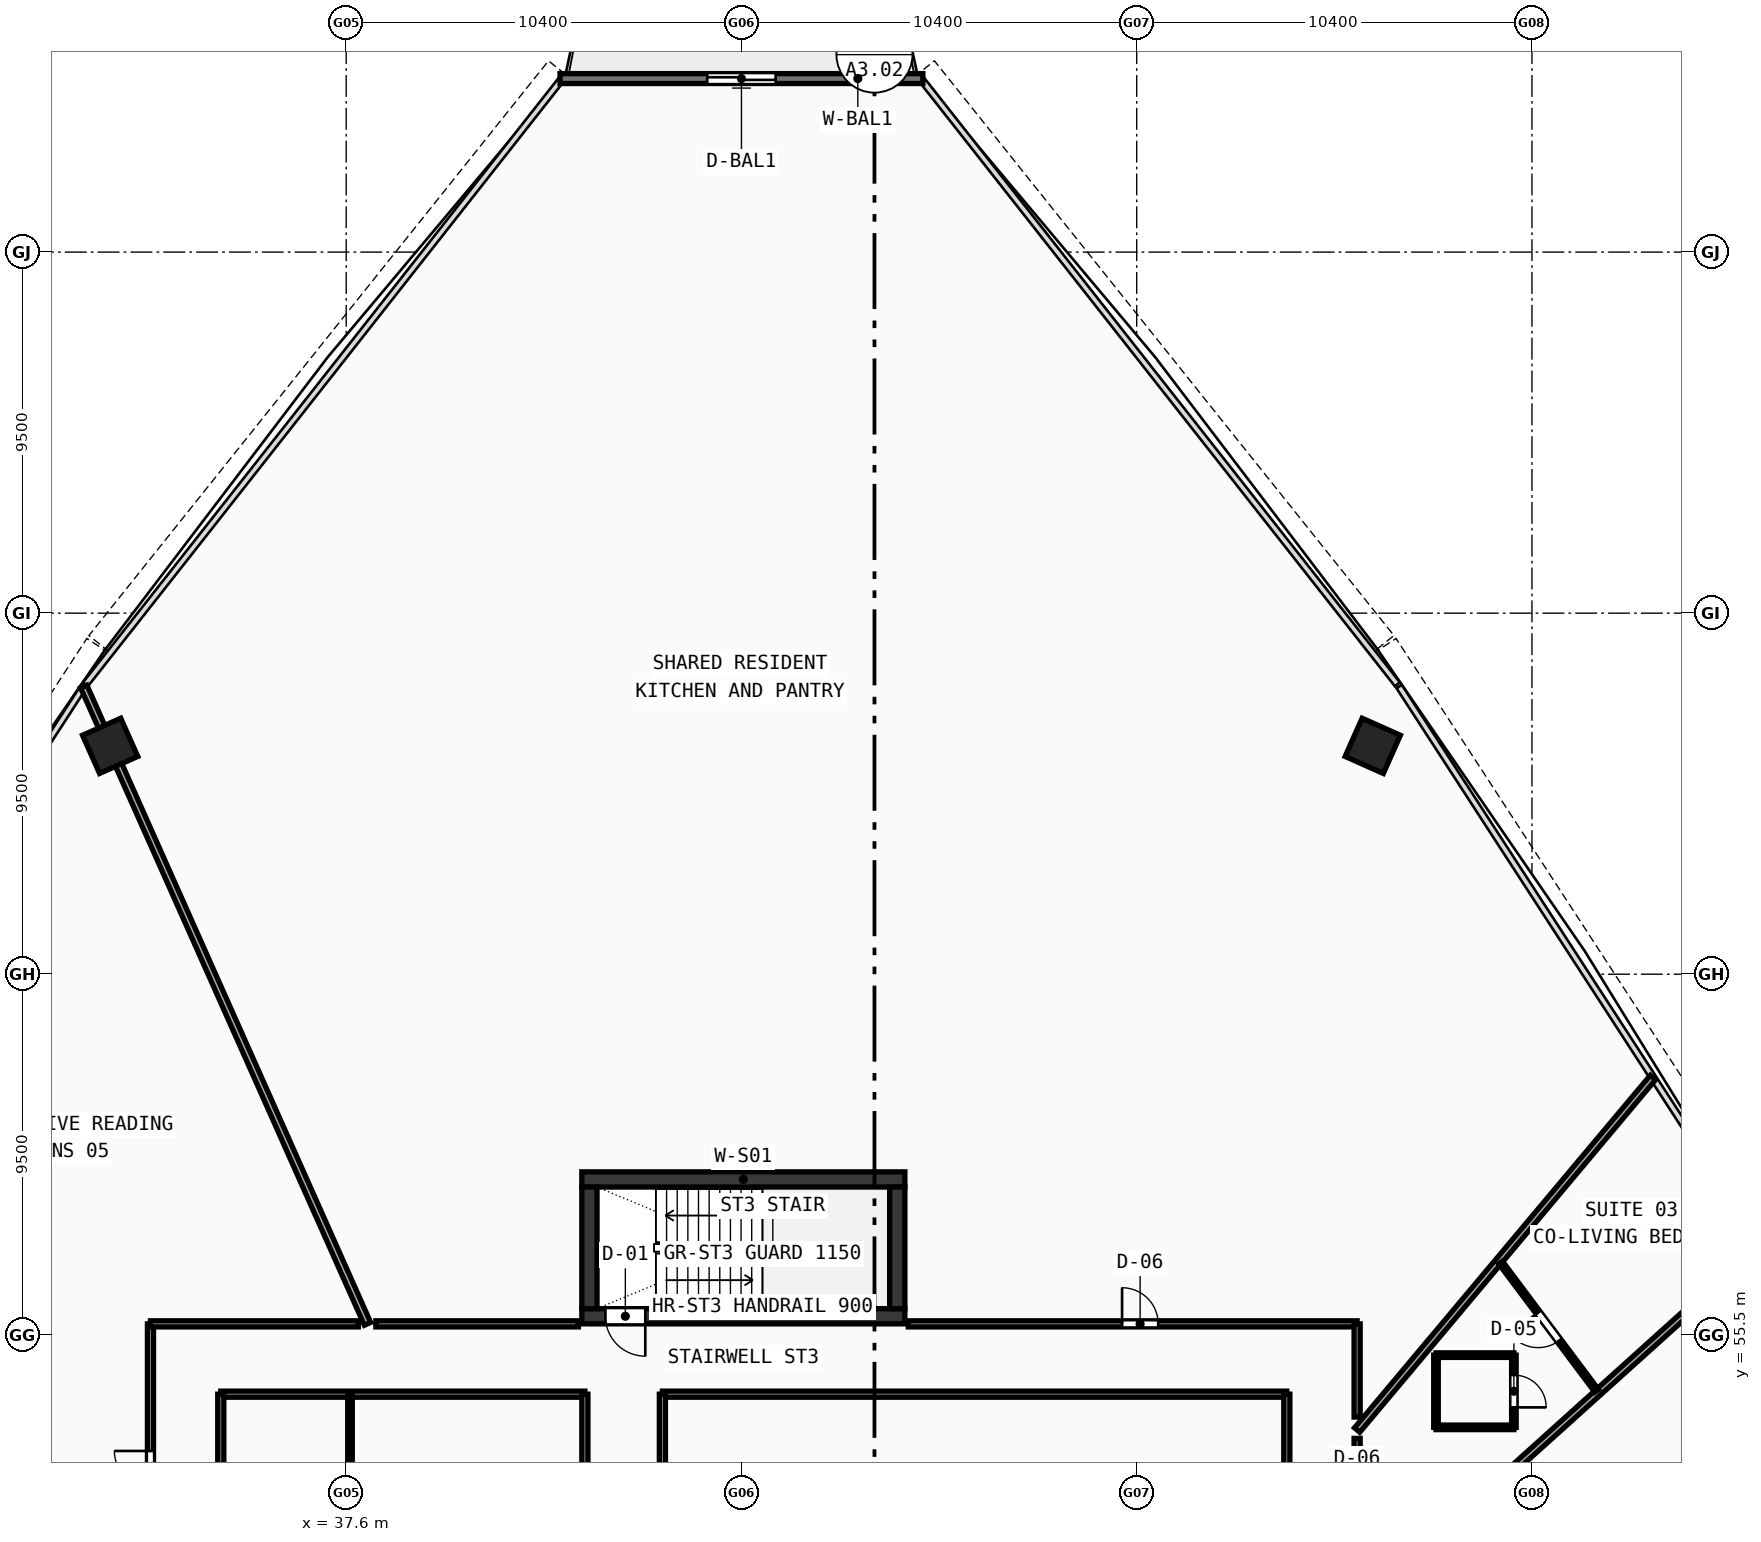
"""IFC4 building model, lengths in metres.
Left out: names, types, materials, properties, quantities, classifications, styles, units other than length and angle.
Written with IfcOpenShell. Run it as: python <this file> out.ifc"""

import sys

from ifc_helpers import new_model, si_unit, direction, frame, frame_2d, origin, origin_with_axes, origin_2d, place, context, subcontext, project, spatial, rectangle, hollow_rectangle, extrude, source, transform, mapped, element, fill, save


model = new_model("IFC4")
c1 = context("Model", 3, precision=1e-05, world=origin(), true_north=direction((0.0, 1.0)))
c2 = subcontext(c1, "Body", "Model", "MODEL_VIEW")
j1 = project(units=[si_unit("LENGTHUNIT", "METRE"), si_unit("PLANEANGLEUNIT", "RADIAN")], contexts=[c1])
p1 = place(None, origin())
s1 = spatial("IfcSite", under=j1, at=p1, CompositionType="ELEMENT")
p2 = place(p1, origin())
s2 = spatial("IfcBuilding", under=s1, at=p2, CompositionType="ELEMENT")
p3 = place(p2, frame((0.0, 0.0, 41.29)))
s3 = spatial("IfcBuildingStorey", under=s2, at=p3, CompositionType="ELEMENT", Elevation=41.29)
p4 = place(p3, frame((43.8, 59.6, 0.0), z_axis=(0.0, 0.0, 1.0), x_axis=(1.0, 0.0, 0.0)))
e1 = element("IfcWall", 1, at=p4, inside=s3, PredefinedType="SHEAR", context=c2, shape_type="SweptSolid", body=[
    extrude(rectangle(XDim=8.5, YDim=0.4, at=frame_2d((4.25, 0.0))), origin(), (0.0, 0.0, 1.0), 3.37),
])
p5 = place(p3, frame((43.8, 56.0, 0.0), z_axis=(0.0, 0.0, 1.0), x_axis=(1.0, 0.0, 0.0)))
e2 = element("IfcWall", 2, at=p5, inside=s3, PredefinedType="SHEAR", context=c2, shape_type="SweptSolid", body=[
    extrude(rectangle(XDim=8.5, YDim=0.4, at=frame_2d((4.25, 0.0))), origin(), (0.0, 0.0, 1.0), 3.37),
])
p6 = place(p5, frame((0.62, 0.0, 0.0)))
e3 = element("IfcOpeningElement", 3, at=p6, cuts=e2, PredefinedType="OPENING", context=c2, shape_type="SweptSolid", body=[
    extrude(rectangle(XDim=1.05, YDim=2.1, at=frame_2d((0.525, 1.05))), frame((0.0, 0.21, 0.0), z_axis=(0.0, -1.0, 0.0), x_axis=(1.0, 0.0, 0.0)), (0.0, 0.0, 1.0), 0.42),
])
for number, where, z_axis, x_axis in (
    (4, (44.0, 56.2, 0.0), (0.0, 0.0, 1.0), (0.0, 1.0, 0.0)),
    (5, (52.1, 56.2, 0.0), (0.0, 0.0, 1.0), (0.0, 1.0, 0.0)),
):
    element("IfcWall", number, at=place(p3, frame(where, z_axis=z_axis, x_axis=x_axis)), inside=s3, PredefinedType="SHEAR", context=c2, shape_type="SweptSolid", body=[
        extrude(rectangle(XDim=3.2, YDim=0.4, at=frame_2d((1.6, 0.0))), origin(), (0.0, 0.0, 1.0), 3.37),
    ])
m1 = source(origin(), c2, "Body", "SweptSolid", [
    extrude(hollow_rectangle(XDim=1.1, YDim=1.1, WallThickness=0.045, at=origin_2d()), origin(), (0.0, 0.0, 1.0), 3.63),
])
for number, where, z_axis, x_axis in (
    (6, (64.611, 71.009, -0.26), (0.0, 0.0, 1.0), (-0.914, 0.407, 0.0)),
    (7, (31.389, 71.009, -0.26), (0.0, 0.0, 1.0), (-0.914, -0.407, 0.0)),
):
    element("IfcColumn", number, at=place(p3, frame(where, z_axis=z_axis, x_axis=x_axis)), inside=s3, PredefinedType="COLUMN", context=c2, shape_type="MappedRepresentation", body=[
        mapped(m1, transform((0.0, 0.0, 0.0), scale=1.0)),
    ])
p7 = place(p3, frame((52.773, 88.566, 0.0), z_axis=(0.0, 0.0, 1.0), x_axis=(-1.0, 0.0, 0.0)))
e8 = element("IfcWall", 8, at=p7, inside=s3, PredefinedType="STANDARD", context=c2, shape_type="SweptSolid", body=[
    extrude(rectangle(XDim=9.546, YDim=0.26, at=frame_2d((4.773, 0.0))), origin(), (0.0, 0.0, 1.0), 3.37),
])
p8 = place(p7, frame((3.873, 0.0, 0.0)))
e9 = element("IfcOpeningElement", 9, at=p8, cuts=e8, PredefinedType="OPENING", context=c2, shape_type="SweptSolid", body=[
    extrude(rectangle(XDim=1.8, YDim=2.15, at=frame_2d((0.9, 1.075))), frame((0.0, 0.14, 0.0), z_axis=(0.0, -1.0, 0.0), x_axis=(1.0, 0.0, 0.0)), (0.0, 0.0, 1.0), 0.28),
])
p9 = place(p3, frame((34.3, 53.95, 0.0), z_axis=(0.0, 0.0, 1.0), x_axis=(1.0, 0.0, 0.0)))
e10 = element("IfcWall", 10, at=p9, inside=s3, PredefinedType="PARTITIONING", context=c2, shape_type="SweptSolid", body=[
    extrude(rectangle(XDim=9.58, YDim=0.16, at=frame_2d((4.79, 0.0))), origin(), (0.0, 0.0, 1.0), 2.67),
])
for number, where, z_axis, x_axis in (
    (11, (34.3, 42.25, 0.0), (0.0, 0.0, 1.0), (0.0, 1.0, 0.0)),
    (12, (43.88, 42.25, 0.0), (0.0, 0.0, 1.0), (0.0, 1.0, 0.0)),
):
    element("IfcWall", number, at=place(p3, frame(where, z_axis=z_axis, x_axis=x_axis)), inside=s3, PredefinedType="PARTITIONING", context=c2, shape_type="SweptSolid", body=[
        extrude(rectangle(XDim=11.7, YDim=0.16, at=frame_2d((5.85, 0.0))), origin(), (0.0, 0.0, 1.0), 2.67),
    ])
p10 = place(p3, frame((37.7, 42.25, 0.0), z_axis=(0.0, 0.0, 1.0), x_axis=(0.0, 1.0, 0.0)))
e13 = element("IfcWall", 13, at=p10, inside=s3, PredefinedType="PARTITIONING", context=c2, shape_type="SweptSolid", body=[
    extrude(rectangle(XDim=11.7, YDim=0.12, at=frame_2d((5.85, 0.0))), origin(), (0.0, 0.0, 1.0), 2.67),
])
p11 = place(p3, frame((45.92, 53.95, 0.0), z_axis=(0.0, 0.0, 1.0), x_axis=(1.0, 0.0, 0.0)))
e14 = element("IfcWall", 14, at=p11, inside=s3, PredefinedType="PARTITIONING", context=c2, shape_type="SweptSolid", body=[
    extrude(rectangle(XDim=16.43, YDim=0.16, at=frame_2d((8.215, 0.0))), origin(), (0.0, 0.0, 1.0), 2.67),
])
p12 = place(p3, frame((45.92, 42.25, 0.0), z_axis=(0.0, 0.0, 1.0), x_axis=(0.0, 1.0, 0.0)))
e15 = element("IfcWall", 15, at=p12, inside=s3, PredefinedType="PARTITIONING", context=c2, shape_type="SweptSolid", body=[
    extrude(rectangle(XDim=11.7, YDim=0.16, at=frame_2d((5.85, 0.0))), origin(), (0.0, 0.0, 1.0), 2.97),
])
p13 = place(p3, frame((62.35, 42.25, 0.0), z_axis=(0.0, 0.0, 1.0), x_axis=(0.0, 1.0, 0.0)))
e16 = element("IfcWall", 16, at=p13, inside=s3, PredefinedType="PARTITIONING", context=c2, shape_type="SweptSolid", body=[
    extrude(rectangle(XDim=11.7, YDim=0.16, at=frame_2d((5.85, 0.0))), origin(), (0.0, 0.0, 1.0), 2.67),
])
p14 = place(p3, frame((64.2, 48.287, 0.0), z_axis=(0.0, 0.0, 1.0), x_axis=(0.743156867614, 0.669117231969, 0.0)))
e17 = element("IfcWall", 17, at=p14, inside=s3, PredefinedType="PARTITIONING", context=c2, shape_type="SweptSolid", body=[
    extrude(rectangle(XDim=14.327, YDim=0.18, at=frame_2d((7.164, 0.0))), origin(), (0.0, 0.0, 1.0), 2.67),
])
p15 = place(p3, frame((64.2, 53.006, 0.0), z_axis=(0.0, 0.0, 1.0), x_axis=(0.642786334534, 0.766045513098, 0.0)))
e18 = element("IfcWall", 18, at=p15, inside=s3, PredefinedType="PARTITIONING", context=c2, shape_type="SweptSolid", body=[
    extrude(rectangle(XDim=12.11, YDim=0.18, at=frame_2d((6.055, 0.0))), origin(), (0.0, 0.0, 1.0), 2.67),
])
p16 = place(p3, frame((38.16, 55.8, 0.0), z_axis=(0.0, 0.0, 1.0), x_axis=(-0.406730734994, 0.913548088067, 0.0)))
e19 = element("IfcWall", 19, at=p16, inside=s3, PredefinedType="PARTITIONING", context=c2, shape_type="SweptSolid", body=[
    extrude(rectangle(XDim=18.356, YDim=0.18, at=frame_2d((9.178, 0.0))), origin(), (0.0, 0.0, 1.0), 2.67),
])
p17 = place(p3, frame((32.45, 47.701, 0.0), z_axis=(0.0, 0.0, 1.0), x_axis=(-0.743155181141, 0.66911910505, 0.0)))
e20 = element("IfcWall", 20, at=p17, inside=s3, PredefinedType="PARTITIONING", context=c2, shape_type="SweptSolid", body=[
    extrude(rectangle(XDim=15.202, YDim=0.18, at=frame_2d((7.601, 0.0))), origin(), (0.0, 0.0, 1.0), 2.67),
])
p18 = place(p3, frame((32.45, 47.997, 0.0), z_axis=(0.0, 0.0, 1.0), x_axis=(0.0, 1.0, 0.0)))
e21 = element("IfcWall", 21, at=p18, inside=s3, PredefinedType="PARTITIONING", context=c2, shape_type="SweptSolid", body=[
    extrude(rectangle(XDim=7.803, YDim=0.16, at=frame_2d((3.901, 0.0))), origin(), (0.0, 0.0, 1.0), 3.37),
])
p19 = place(p18, frame((3.508, 0.0, 0.0)))
e22 = element("IfcOpeningElement", 22, at=p19, cuts=e21, PredefinedType="OPENING", context=c2, shape_type="SweptSolid", body=[
    extrude(rectangle(XDim=0.95, YDim=2.1, at=frame_2d((0.475, 1.05))), frame((0.0, 0.09, 0.0), z_axis=(0.0, -1.0, 0.0), x_axis=(1.0, 0.0, 0.0)), (0.0, 0.0, 1.0), 0.18),
])
p20 = place(p3, frame((32.45, 55.8, 0.0), z_axis=(0.0, 0.0, 1.0), x_axis=(1.0, 0.0, 0.0)))
e23 = element("IfcWall", 23, at=p20, inside=s3, PredefinedType="PARTITIONING", context=c2, shape_type="SweptSolid", body=[
    extrude(rectangle(XDim=5.47, YDim=0.16, at=frame_2d((2.735, 0.0))), origin(), (0.0, 0.0, 1.0), 3.37),
])
p21 = place(p3, frame((38.38, 55.8, 0.0), z_axis=(0.0, 0.0, 1.0), x_axis=(1.0, 0.0, 0.0)))
e24 = element("IfcWall", 24, at=p21, inside=s3, PredefinedType="PARTITIONING", context=c2, shape_type="SweptSolid", body=[
    extrude(rectangle(XDim=5.329, YDim=0.16, at=frame_2d((2.665, 0.0))), origin(), (0.0, 0.0, 1.0), 2.67),
])
p22 = place(p3, frame((52.391, 55.8, 0.0), z_axis=(0.0, 0.0, 1.0), x_axis=(1.0, 0.0, 0.0)))
e25 = element("IfcWall", 25, at=p22, inside=s3, PredefinedType="PARTITIONING", context=c2, shape_type="SweptSolid", body=[
    extrude(rectangle(XDim=11.809, YDim=0.16, at=frame_2d((5.904, 0.0))), origin(), (0.0, 0.0, 1.0), 2.67),
])
p23 = place(p22, frame((5.624, 0.0, 0.0)))
e26 = element("IfcOpeningElement", 26, at=p23, cuts=e25, PredefinedType="OPENING", context=c2, shape_type="SweptSolid", body=[
    extrude(rectangle(XDim=0.95, YDim=2.1, at=frame_2d((0.475, 1.05))), frame((0.0, 0.09, 0.0), z_axis=(0.0, -1.0, 0.0), x_axis=(1.0, 0.0, 0.0)), (0.0, 0.0, 1.0), 0.18),
])
p24 = place(p3, frame((64.2, 55.8, 0.0), z_axis=(0.0, 0.0, 1.0), x_axis=(0.0, -1.0, 0.0)))
e27 = element("IfcWall", 27, at=p24, inside=s3, PredefinedType="PARTITIONING", context=c2, shape_type="SweptSolid", body=[
    extrude(rectangle(XDim=2.451, YDim=0.16, at=frame_2d((1.226, 0.0))), origin(), (0.0, 0.0, 1.0), 2.97),
])
p25 = place(p3, frame((64.2, 52.787, 0.0), z_axis=(0.0, 0.0, 1.0), x_axis=(0.0, -1.0, 0.0)))
e28 = element("IfcWall", 28, at=p25, inside=s3, PredefinedType="PARTITIONING", context=c2, shape_type="SweptSolid", body=[
    extrude(rectangle(XDim=4.204, YDim=0.16, at=frame_2d((2.102, 0.0))), origin(), (0.0, 0.0, 1.0), 3.37),
])
p26 = place(p25, frame((1.665, 0.0, 0.0)))
e29 = element("IfcOpeningElement", 29, at=p26, cuts=e28, PredefinedType="OPENING", context=c2, shape_type="SweptSolid", body=[
    extrude(rectangle(XDim=0.95, YDim=2.1, at=frame_2d((0.475, 1.05))), frame((0.0, 0.09, 0.0), z_axis=(0.0, -1.0, 0.0), x_axis=(1.0, 0.0, 0.0)), (0.0, 0.0, 1.0), 0.18),
])
p27 = place(p3, frame((66.275, 53.077, 0.0), z_axis=(0.0, 0.0, 1.0), x_axis=(1.0, 0.0, 0.0)))
e30 = element("IfcWall", 30, at=p27, inside=s3, PredefinedType="PARTITIONING", context=c2, shape_type="SweptSolid", body=[
    extrude(rectangle(XDim=2.05, YDim=0.12, at=frame_2d((1.025, 0.0))), origin(), (0.0, 0.0, 1.0), 2.97),
])
p28 = place(p3, frame((68.325, 53.077, 0.0), z_axis=(0.0, 0.0, 1.0), x_axis=(0.0, 1.0, 0.0)))
e31 = element("IfcWall", 31, at=p28, inside=s3, PredefinedType="PARTITIONING", context=c2, shape_type="SweptSolid", body=[
    extrude(rectangle(XDim=1.9, YDim=0.12, at=frame_2d((0.95, 0.0))), origin(), (0.0, 0.0, 1.0), 3.37),
])
p29 = place(p28, frame((0.525, 0.0, 0.0)))
e32 = element("IfcOpeningElement", 32, at=p29, cuts=e31, PredefinedType="OPENING", context=c2, shape_type="SweptSolid", body=[
    extrude(rectangle(XDim=0.85, YDim=2.1, at=frame_2d((0.425, 1.05))), frame((0.0, 0.07, 0.0), z_axis=(0.0, -1.0, 0.0), x_axis=(1.0, 0.0, 0.0)), (0.0, 0.0, 1.0), 0.14),
])
p30 = place(p3, frame((68.325, 54.977, 0.0), z_axis=(0.0, 0.0, 1.0), x_axis=(-1.0, 0.0, 0.0)))
e33 = element("IfcWall", 33, at=p30, inside=s3, PredefinedType="PARTITIONING", context=c2, shape_type="SweptSolid", body=[
    extrude(rectangle(XDim=2.05, YDim=0.12, at=frame_2d((1.025, 0.0))), origin(), (0.0, 0.0, 1.0), 3.37),
])
p31 = place(p3, frame((66.275, 54.977, 0.0), z_axis=(0.0, 0.0, 1.0), x_axis=(0.0, -1.0, 0.0)))
e34 = element("IfcWall", 34, at=p31, inside=s3, PredefinedType="PARTITIONING", context=c2, shape_type="SweptSolid", body=[
    extrude(rectangle(XDim=1.9, YDim=0.12, at=frame_2d((0.95, 0.0))), origin(), (0.0, 0.0, 1.0), 2.97),
])
p32 = place(p3, frame((70.501, 54.04, 0.0), z_axis=(0.0, 0.0, 1.0), x_axis=(-0.599443526822, 0.800417052636, 0.0)))
e35 = element("IfcWall", 35, at=p32, inside=s3, PredefinedType="PARTITIONING", context=c2, shape_type="SweptSolid", body=[
    extrude(rectangle(XDim=4.213, YDim=0.12, at=frame_2d((2.106, 0.0))), origin(), (0.0, 0.0, 1.0), 2.67),
])
p33 = place(p32, frame((1.646, 0.0, 0.0)))
e36 = element("IfcOpeningElement", 36, at=p33, cuts=e35, PredefinedType="OPENING", context=c2, shape_type="SweptSolid", body=[
    extrude(rectangle(XDim=0.92, YDim=2.1, at=frame_2d((0.46, 1.05))), frame((0.0, 0.07, 0.0), z_axis=(0.0, -1.0, 0.0), x_axis=(1.0, 0.0, 0.0)), (0.0, 0.0, 1.0), 0.14),
])
m2 = source(origin(), c2, "Body", "SweptSolid", [
    extrude(rectangle(XDim=1.8, YDim=2.15, at=frame_2d((0.9, 1.075))), frame((0.0, 0.025, 0.0), z_axis=(0.0, -1.0, 0.0), x_axis=(1.0, 0.0, 0.0)), (0.0, 0.0, 1.0), 0.05),
])
p34 = place(p8, origin_with_axes())
e37 = element("IfcDoor", 37, at=p34, inside=s3, OperationType="DOUBLE_DOOR_SLIDING", PredefinedType="DOOR", context=c2, shape_type="MappedRepresentation", body=[
    mapped(m2, transform((0.0, 0.0, 0.0), scale=1.0)),
])
fill(e9, e37)
m3 = source(origin(), c2, "Body", "SweptSolid", [
    extrude(rectangle(XDim=1.05, YDim=2.1, at=frame_2d((0.525, 1.05))), frame((0.0, 0.025, 0.0), z_axis=(0.0, -1.0, 0.0), x_axis=(1.0, 0.0, 0.0)), (0.0, 0.0, 1.0), 0.05),
])
p35 = place(p6, frame((1.05, 0.0, 0.0), z_axis=(0.0, 0.0, 1.0), x_axis=(-1.0, 0.0, 0.0)))
e38 = element("IfcDoor", 38, at=p35, inside=s3, OperationType="SINGLE_SWING_LEFT", PredefinedType="DOOR", context=c2, shape_type="MappedRepresentation", body=[
    mapped(m3, transform((0.0, 0.0, 0.0), scale=1.0)),
])
fill(e3, e38)
m4 = source(origin(), c2, "Body", "SweptSolid", [
    extrude(rectangle(XDim=0.85, YDim=2.1, at=frame_2d((0.425, 1.05))), frame((0.0, 0.025, 0.0), z_axis=(0.0, -1.0, 0.0), x_axis=(1.0, 0.0, 0.0)), (0.0, 0.0, 1.0), 0.05),
])
p36 = place(p29, frame((0.85, 0.0, 0.0), z_axis=(0.0, 0.0, 1.0), x_axis=(-1.0, 0.0, 0.0)))
e39 = element("IfcDoor", 39, at=p36, inside=s3, OperationType="SINGLE_SWING_RIGHT", PredefinedType="DOOR", context=c2, shape_type="MappedRepresentation", body=[
    mapped(m4, transform((0.0, 0.0, 0.0), scale=1.0)),
])
fill(e32, e39)
m5 = source(origin(), c2, "Body", "SweptSolid", [
    extrude(rectangle(XDim=0.92, YDim=2.1, at=frame_2d((0.46, 1.05))), frame((0.0, 0.025, 0.0), z_axis=(0.0, -1.0, 0.0), x_axis=(1.0, 0.0, 0.0)), (0.0, 0.0, 1.0), 0.05),
])
p37 = place(p33, origin_with_axes())
e40 = element("IfcDoor", 40, at=p37, inside=s3, OperationType="SINGLE_SWING_RIGHT", PredefinedType="DOOR", context=c2, shape_type="MappedRepresentation", body=[
    mapped(m5, transform((0.0, 0.0, 0.0), scale=1.0)),
])
fill(e36, e40)
m6 = source(origin(), c2, "Body", "SweptSolid", [
    extrude(rectangle(XDim=0.95, YDim=2.1, at=frame_2d((0.475, 1.05))), frame((0.0, 0.025, 0.0), z_axis=(0.0, -1.0, 0.0), x_axis=(1.0, 0.0, 0.0)), (0.0, 0.0, 1.0), 0.05),
])
p38 = place(p23, origin_with_axes())
e41 = element("IfcDoor", 41, at=p38, inside=s3, OperationType="SINGLE_SWING_LEFT", PredefinedType="DOOR", context=c2, shape_type="MappedRepresentation", body=[
    mapped(m6, transform((0.0, 0.0, 0.0), scale=1.0)),
])
fill(e26, e41)
p39 = place(p19, origin_with_axes())
e42 = element("IfcDoor", 42, at=p39, inside=s3, OperationType="SINGLE_SWING_RIGHT", PredefinedType="DOOR", context=c2, shape_type="MappedRepresentation", body=[
    mapped(m6, transform((0.0, 0.0, 0.0), scale=1.0)),
])
fill(e22, e42)
save(model, sys.argv[1])
